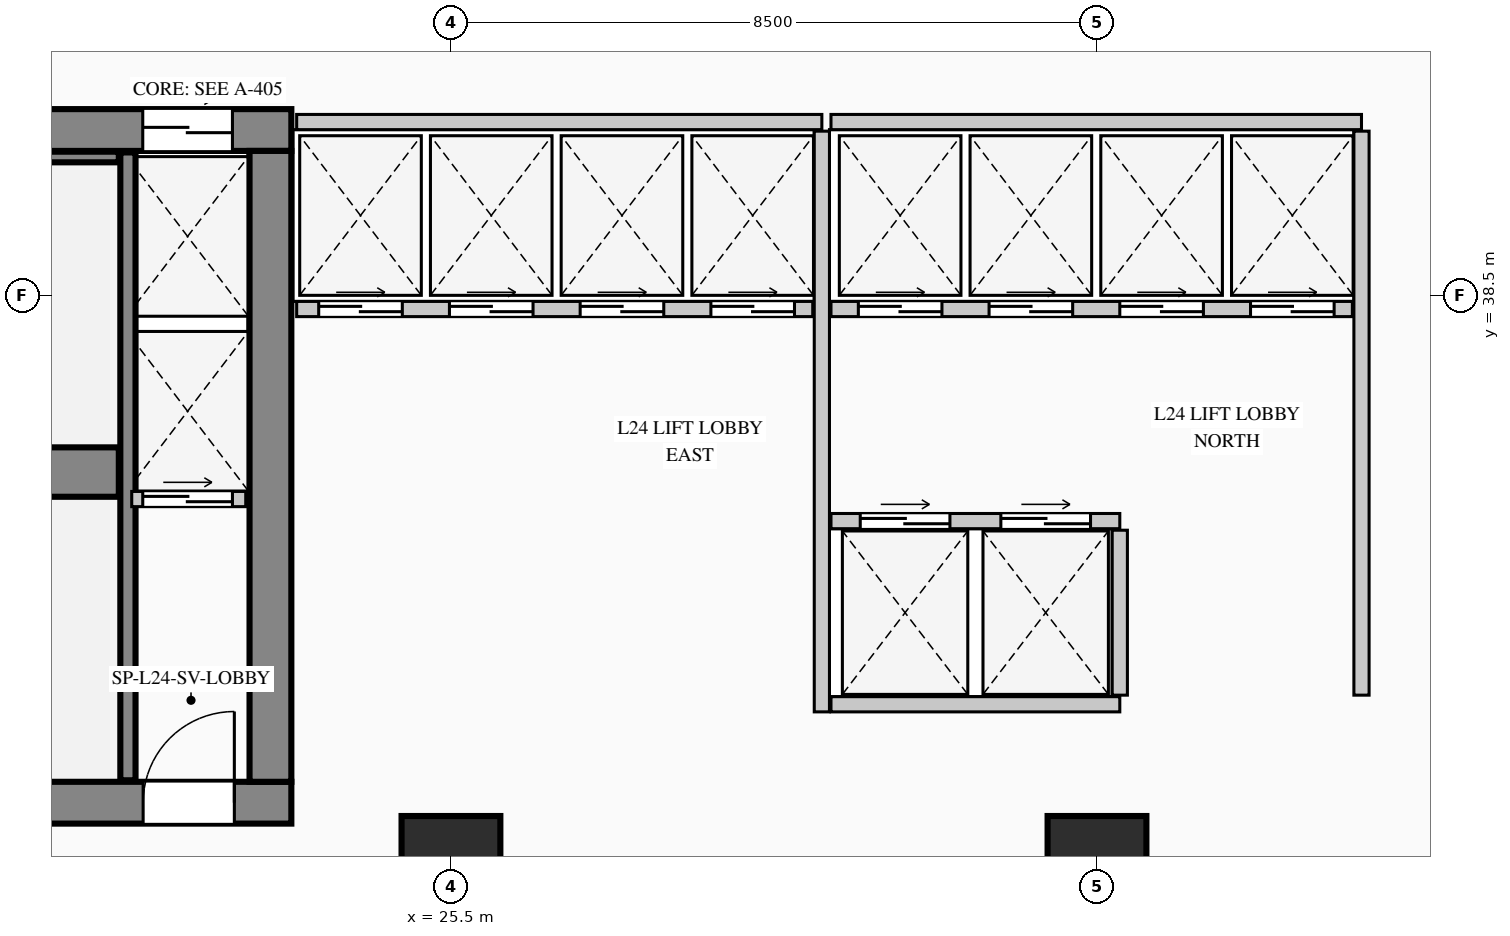
"""IFC4 building model, lengths in metres.
Left out: names, types, materials, properties, quantities, classifications, styles, units other than length and angle.
Written with IfcOpenShell. Run it as: python <this file> out.ifc"""

import sys

from ifc_helpers import new_model, si_unit, direction, frame, frame_2d, origin, origin_2d, place, context, subcontext, project, spatial, rectangle, extrude, element, fill, save


model = new_model("IFC4")
c1 = context("Model", 3, precision=1e-05, world=origin(), true_north=direction((0.0, 1.0)))
c2 = subcontext(c1, "Body", "Model", "MODEL_VIEW")
j1 = project(units=[si_unit("LENGTHUNIT", "METRE"), si_unit("PLANEANGLEUNIT", "RADIAN")], contexts=[c1])
p1 = place(None, origin())
s1 = spatial("IfcSite", under=j1, at=p1, CompositionType="ELEMENT")
p2 = place(p1, origin())
s2 = spatial("IfcBuilding", under=s1, at=p2, CompositionType="ELEMENT")
p3 = place(p2, frame((0.0, 0.0, 106.2)))
s3 = spatial("IfcBuildingStorey", under=s2, at=p3, CompositionType="ELEMENT", Elevation=106.2)
p4 = place(p3, frame((5.45, 40.675, 0.0), z_axis=(0.0, 0.0, 1.0), x_axis=(1.0, 0.0, 0.0)))
e1 = element("IfcWall", 1, at=p4, inside=s3, PredefinedType="SHEAR", context=c2, shape_type="SweptSolid", body=[
    extrude(rectangle(XDim=17.95, YDim=0.55, at=frame_2d((8.975, 0.0))), origin(), (0.0, 0.0, 1.0), 5.2),
])
p5 = place(p4, frame((15.995, 0.0, 0.0)))
e2 = element("IfcOpeningElement", 2, at=p5, cuts=e1, PredefinedType="OPENING", context=c2, shape_type="SweptSolid", body=[
    extrude(rectangle(XDim=1.18, YDim=2.25, at=frame_2d((0.59, 1.125))), frame((0.0, 0.285, 0.0), z_axis=(0.0, -1.0, 0.0), x_axis=(1.0, 0.0, 0.0)), (0.0, 0.0, 1.0), 0.57),
])
p6 = place(p3, frame((5.45, 31.825, 0.0), z_axis=(0.0, 0.0, 1.0), x_axis=(1.0, 0.0, 0.0)))
e3 = element("IfcWall", 3, at=p6, inside=s3, PredefinedType="SHEAR", context=c2, shape_type="SweptSolid", body=[
    extrude(rectangle(XDim=17.95, YDim=0.55, at=frame_2d((8.975, 0.0))), origin(), (0.0, 0.0, 1.0), 5.2),
])
p7 = place(p6, frame((3.2, 0.0, 0.0)))
e4 = element("IfcOpeningElement", 4, at=p7, cuts=e3, PredefinedType="OPENING", context=c2, shape_type="SweptSolid", body=[
    extrude(rectangle(XDim=1.2, YDim=2.2, at=frame_2d((0.6, 1.1))), frame((0.0, 0.285, 0.0), z_axis=(0.0, -1.0, 0.0), x_axis=(1.0, 0.0, 0.0)), (0.0, 0.0, 1.0), 0.57),
])
p8 = place(p6, frame((7.05, 0.0, 0.0)))
e5 = element("IfcOpeningElement", 5, at=p8, cuts=e3, PredefinedType="OPENING", context=c2, shape_type="SweptSolid", body=[
    extrude(rectangle(XDim=1.2, YDim=2.2, at=frame_2d((0.6, 1.1))), frame((0.0, 0.285, 0.0), z_axis=(0.0, -1.0, 0.0), x_axis=(1.0, 0.0, 0.0)), (0.0, 0.0, 1.0), 0.57),
])
p9 = place(p6, frame((8.9, 0.0, 0.0)))
e6 = element("IfcOpeningElement", 6, at=p9, cuts=e3, PredefinedType="OPENING", context=c2, shape_type="SweptSolid", body=[
    extrude(rectangle(XDim=1.15, YDim=2.2, at=frame_2d((0.575, 1.1))), frame((0.0, 0.285, 0.0), z_axis=(0.0, -1.0, 0.0), x_axis=(1.0, 0.0, 0.0)), (0.0, 0.0, 1.0), 0.57),
])
p10 = place(p6, frame((16.0, 0.0, 0.0)))
e7 = element("IfcOpeningElement", 7, at=p10, cuts=e3, PredefinedType="OPENING", context=c2, shape_type="SweptSolid", body=[
    extrude(rectangle(XDim=1.2, YDim=2.2, at=frame_2d((0.6, 1.1))), frame((0.0, 0.285, 0.0), z_axis=(0.0, -1.0, 0.0), x_axis=(1.0, 0.0, 0.0)), (0.0, 0.0, 1.0), 0.57),
])
p11 = place(p3, frame((23.125, 32.1, 0.0), z_axis=(0.0, 0.0, 1.0), x_axis=(0.0, 1.0, 0.0)))
e8 = element("IfcWall", 8, at=p11, inside=s3, PredefinedType="SHEAR", context=c2, shape_type="SweptSolid", body=[
    extrude(rectangle(XDim=8.3, YDim=0.55, at=frame_2d((4.15, 0.0))), origin(), (0.0, 0.0, 1.0), 5.2),
])
p12 = place(p3, frame((14.12, 36.175, 0.0), z_axis=(0.0, 0.0, 1.0), x_axis=(1.0, 0.0, 0.0)))
e9 = element("IfcWall", 9, at=p12, inside=s3, PredefinedType="SHEAR", context=c2, shape_type="SweptSolid", body=[
    extrude(rectangle(XDim=7.01, YDim=0.65, at=frame_2d((3.505, 0.0))), origin(), (0.0, 0.0, 1.0), 5.2),
])
p13 = place(p3, frame((21.25, 32.12, 0.0), z_axis=(0.0, 0.0, 1.0), x_axis=(0.0, 1.0, 0.0)))
e10 = element("IfcWall", 10, at=p13, inside=s3, PredefinedType="SHEAR", context=c2, shape_type="SweptSolid", body=[
    extrude(rectangle(XDim=8.26, YDim=0.2, at=frame_2d((4.13, 0.0))), origin(), (0.0, 0.0, 1.0), 5.2),
])
p14 = place(p3, frame((14.12, 40.32, 0.0), z_axis=(0.0, 0.0, 1.0), x_axis=(1.0, 0.0, 0.0)))
e11 = element("IfcWall", 11, at=p14, inside=s3, PredefinedType="SHEAR", context=c2, shape_type="SweptSolid", body=[
    extrude(rectangle(XDim=7.01, YDim=0.14, at=frame_2d((3.505, 0.0))), origin(), (0.0, 0.0, 1.0), 5.2),
])
for number, where, z_axis, x_axis in (
    (12, (25.5, 31.0, 0.0), (0.0, 0.0, 1.0), (1.0, 0.0, 0.0)),
    (13, (34.0, 31.0, 0.0), (0.0, 0.0, 1.0), (1.0, 0.0, 0.0)),
):
    element("IfcColumn", number, at=place(p3, frame(where, z_axis=z_axis, x_axis=x_axis)), inside=s3, PredefinedType="COLUMN", context=c2, shape_type="SweptSolid", body=[
        extrude(rectangle(XDim=1.3, YDim=1.3, at=origin_2d()), origin(), (0.0, 0.0, 1.0), 5.2),
    ])
p15 = place(p3, frame((21.3, 35.82, 0.0), z_axis=(0.0, 0.0, 1.0), x_axis=(1.0, 0.0, 0.0)))
e14 = element("IfcWall", 14, at=p15, inside=s3, PredefinedType="PARTITIONING", context=c2, shape_type="SweptSolid", body=[
    extrude(rectangle(XDim=1.5, YDim=0.2, at=frame_2d((0.75, 0.0))), origin(), (0.0, 0.0, 1.0), 4.94),
])
p16 = place(p15, frame((0.145, 0.0, 0.0)))
e15 = element("IfcOpeningElement", 15, at=p16, cuts=e14, PredefinedType="OPENING", context=c2, shape_type="SweptSolid", body=[
    extrude(rectangle(XDim=1.18, YDim=2.25, at=frame_2d((0.59, 1.125))), frame((0.0, 0.11, 0.0), z_axis=(0.0, -1.0, 0.0), x_axis=(1.0, 0.0, 0.0)), (0.0, 0.0, 1.0), 0.22),
])
p17 = place(p3, frame((23.47, 40.78, 0.0), z_axis=(0.0, 0.0, 1.0), x_axis=(1.0, 0.0, 0.0)))
e16 = element("IfcWall", 16, at=p17, inside=s3, PredefinedType="PARTITIONING", context=c2, shape_type="SweptSolid", body=[
    extrude(rectangle(XDim=6.91, YDim=0.2, at=frame_2d((3.455, 0.0))), origin(), (0.0, 0.0, 1.0), 4.94),
])
p18 = place(p3, frame((30.38, 33.02, 0.0), z_axis=(0.0, 0.0, 1.0), x_axis=(0.0, 1.0, 0.0)))
e17 = element("IfcWall", 17, at=p18, inside=s3, PredefinedType="PARTITIONING", context=c2, shape_type="SweptSolid", body=[
    extrude(rectangle(XDim=7.64, YDim=0.2, at=frame_2d((3.82, 0.0))), origin(), (0.0, 0.0, 1.0), 4.94),
])
p19 = place(p3, frame((23.47, 38.32, 0.0), z_axis=(0.0, 0.0, 1.0), x_axis=(1.0, 0.0, 0.0)))
e18 = element("IfcWall", 18, at=p19, inside=s3, PredefinedType="PARTITIONING", context=c2, shape_type="SweptSolid", body=[
    extrude(rectangle(XDim=6.79, YDim=0.2, at=frame_2d((3.395, 0.0))), origin(), (0.0, 0.0, 1.0), 4.94),
])
p20 = place(p19, frame((0.29, 0.0, 0.0)))
e19 = element("IfcOpeningElement", 19, at=p20, cuts=e18, PredefinedType="OPENING", context=c2, shape_type="SweptSolid", body=[
    extrude(rectangle(XDim=1.1, YDim=2.2, at=frame_2d((0.55, 1.1))), frame((0.0, 0.11, 0.0), z_axis=(0.0, -1.0, 0.0), x_axis=(1.0, 0.0, 0.0)), (0.0, 0.0, 1.0), 0.22),
])
p21 = place(p19, frame((2.01, 0.0, 0.0)))
e20 = element("IfcOpeningElement", 20, at=p21, cuts=e18, PredefinedType="OPENING", context=c2, shape_type="SweptSolid", body=[
    extrude(rectangle(XDim=1.1, YDim=2.2, at=frame_2d((0.55, 1.1))), frame((0.0, 0.11, 0.0), z_axis=(0.0, -1.0, 0.0), x_axis=(1.0, 0.0, 0.0)), (0.0, 0.0, 1.0), 0.22),
])
p22 = place(p19, frame((3.73, 0.0, 0.0)))
e21 = element("IfcOpeningElement", 21, at=p22, cuts=e18, PredefinedType="OPENING", context=c2, shape_type="SweptSolid", body=[
    extrude(rectangle(XDim=1.1, YDim=2.2, at=frame_2d((0.55, 1.1))), frame((0.0, 0.11, 0.0), z_axis=(0.0, -1.0, 0.0), x_axis=(1.0, 0.0, 0.0)), (0.0, 0.0, 1.0), 0.22),
])
p23 = place(p19, frame((5.45, 0.0, 0.0)))
e22 = element("IfcOpeningElement", 22, at=p23, cuts=e18, PredefinedType="OPENING", context=c2, shape_type="SweptSolid", body=[
    extrude(rectangle(XDim=1.1, YDim=2.2, at=frame_2d((0.55, 1.1))), frame((0.0, 0.11, 0.0), z_axis=(0.0, -1.0, 0.0), x_axis=(1.0, 0.0, 0.0)), (0.0, 0.0, 1.0), 0.22),
])
p24 = place(p3, frame((30.5, 40.78, 0.0), z_axis=(0.0, 0.0, 1.0), x_axis=(1.0, 0.0, 0.0)))
e23 = element("IfcWall", 23, at=p24, inside=s3, PredefinedType="PARTITIONING", context=c2, shape_type="SweptSolid", body=[
    extrude(rectangle(XDim=6.98, YDim=0.2, at=frame_2d((3.49, 0.0))), origin(), (0.0, 0.0, 1.0), 4.94),
])
p25 = place(p3, frame((37.48, 33.24, 0.0), z_axis=(0.0, 0.0, 1.0), x_axis=(0.0, 1.0, 0.0)))
e24 = element("IfcWall", 24, at=p25, inside=s3, PredefinedType="PARTITIONING", context=c2, shape_type="SweptSolid", body=[
    extrude(rectangle(XDim=7.42, YDim=0.2, at=frame_2d((3.71, 0.0))), origin(), (0.0, 0.0, 1.0), 4.94),
])
p26 = place(p3, frame((30.5, 38.32, 0.0), z_axis=(0.0, 0.0, 1.0), x_axis=(1.0, 0.0, 0.0)))
e25 = element("IfcWall", 25, at=p26, inside=s3, PredefinedType="PARTITIONING", context=c2, shape_type="SweptSolid", body=[
    extrude(rectangle(XDim=6.86, YDim=0.2, at=frame_2d((3.43, 0.0))), origin(), (0.0, 0.0, 1.0), 4.94),
])
p27 = place(p26, frame((0.36, 0.0, 0.0)))
e26 = element("IfcOpeningElement", 26, at=p27, cuts=e25, PredefinedType="OPENING", context=c2, shape_type="SweptSolid", body=[
    extrude(rectangle(XDim=1.1, YDim=2.2, at=frame_2d((0.55, 1.1))), frame((0.0, 0.11, 0.0), z_axis=(0.0, -1.0, 0.0), x_axis=(1.0, 0.0, 0.0)), (0.0, 0.0, 1.0), 0.22),
])
p28 = place(p26, frame((2.08, 0.0, 0.0)))
e27 = element("IfcOpeningElement", 27, at=p28, cuts=e25, PredefinedType="OPENING", context=c2, shape_type="SweptSolid", body=[
    extrude(rectangle(XDim=1.1, YDim=2.2, at=frame_2d((0.55, 1.1))), frame((0.0, 0.11, 0.0), z_axis=(0.0, -1.0, 0.0), x_axis=(1.0, 0.0, 0.0)), (0.0, 0.0, 1.0), 0.22),
])
p29 = place(p26, frame((3.8, 0.0, 0.0)))
e28 = element("IfcOpeningElement", 28, at=p29, cuts=e25, PredefinedType="OPENING", context=c2, shape_type="SweptSolid", body=[
    extrude(rectangle(XDim=1.1, YDim=2.2, at=frame_2d((0.55, 1.1))), frame((0.0, 0.11, 0.0), z_axis=(0.0, -1.0, 0.0), x_axis=(1.0, 0.0, 0.0)), (0.0, 0.0, 1.0), 0.22),
])
p30 = place(p26, frame((5.52, 0.0, 0.0)))
e29 = element("IfcOpeningElement", 29, at=p30, cuts=e25, PredefinedType="OPENING", context=c2, shape_type="SweptSolid", body=[
    extrude(rectangle(XDim=1.1, YDim=2.2, at=frame_2d((0.55, 1.1))), frame((0.0, 0.11, 0.0), z_axis=(0.0, -1.0, 0.0), x_axis=(1.0, 0.0, 0.0)), (0.0, 0.0, 1.0), 0.22),
])
p31 = place(p3, frame((30.5, 35.53, 0.0), z_axis=(0.0, 0.0, 1.0), x_axis=(1.0, 0.0, 0.0)))
e30 = element("IfcWall", 30, at=p31, inside=s3, PredefinedType="PARTITIONING", context=c2, shape_type="SweptSolid", body=[
    extrude(rectangle(XDim=3.8, YDim=0.2, at=frame_2d((1.9, 0.0))), origin(), (0.0, 0.0, 1.0), 4.94),
])
p32 = place(p31, frame((0.385, 0.0, 0.0)))
e31 = element("IfcOpeningElement", 31, at=p32, cuts=e30, PredefinedType="OPENING", context=c2, shape_type="SweptSolid", body=[
    extrude(rectangle(XDim=1.18, YDim=2.25, at=frame_2d((0.59, 1.125))), frame((0.0, 0.11, 0.0), z_axis=(0.0, -1.0, 0.0), x_axis=(1.0, 0.0, 0.0)), (0.0, 0.0, 1.0), 0.22),
])
p33 = place(p31, frame((2.235, 0.0, 0.0)))
e32 = element("IfcOpeningElement", 32, at=p33, cuts=e30, PredefinedType="OPENING", context=c2, shape_type="SweptSolid", body=[
    extrude(rectangle(XDim=1.18, YDim=2.25, at=frame_2d((0.59, 1.125))), frame((0.0, 0.11, 0.0), z_axis=(0.0, -1.0, 0.0), x_axis=(1.0, 0.0, 0.0)), (0.0, 0.0, 1.0), 0.22),
])
p34 = place(p3, frame((30.5, 33.12, 0.0), z_axis=(0.0, 0.0, 1.0), x_axis=(1.0, 0.0, 0.0)))
e33 = element("IfcWall", 33, at=p34, inside=s3, PredefinedType="PARTITIONING", context=c2, shape_type="SweptSolid", body=[
    extrude(rectangle(XDim=3.8, YDim=0.2, at=frame_2d((1.9, 0.0))), origin(), (0.0, 0.0, 1.0), 4.94),
])
p35 = place(p3, frame((34.3, 33.24, 0.0), z_axis=(0.0, 0.0, 1.0), x_axis=(0.0, 1.0, 0.0)))
e34 = element("IfcWall", 34, at=p35, inside=s3, PredefinedType="PARTITIONING", context=c2, shape_type="SweptSolid", body=[
    extrude(rectangle(XDim=2.17, YDim=0.2, at=frame_2d((1.085, 0.0))), origin(), (0.0, 0.0, 1.0), 4.94),
])
p36 = place(p10, origin())
e35 = element("IfcDoor", 35, at=p36, inside=s3, OperationType="SINGLE_SWING_RIGHT", PredefinedType="DOOR", context=c2, shape_type="SweptSolid", body=[
    extrude(rectangle(XDim=1.2, YDim=2.2, at=frame_2d((0.6, 1.1))), frame((0.0, 0.025, 0.0), z_axis=(0.0, -1.0, 0.0), x_axis=(1.0, 0.0, 0.0)), (0.0, 0.0, 1.0), 0.05),
])
fill(e7, e35)
p37 = place(p5, origin())
e36 = element("IfcDoor", 36, at=p37, inside=s3, OperationType="DOUBLE_DOOR_SLIDING", PredefinedType="DOOR", context=c2, shape_type="SweptSolid", body=[
    extrude(rectangle(XDim=1.18, YDim=2.25, at=frame_2d((0.59, 1.125))), frame((0.0, 0.025, 0.0), z_axis=(0.0, -1.0, 0.0), x_axis=(1.0, 0.0, 0.0)), (0.0, 0.0, 1.0), 0.05),
])
fill(e2, e36)
p38 = place(p16, origin())
e37 = element("IfcDoor", 37, at=p38, inside=s3, OperationType="DOUBLE_DOOR_SLIDING", PredefinedType="DOOR", context=c2, shape_type="SweptSolid", body=[
    extrude(rectangle(XDim=1.18, YDim=2.25, at=frame_2d((0.59, 1.125))), frame((0.0, 0.025, 0.0), z_axis=(0.0, -1.0, 0.0), x_axis=(1.0, 0.0, 0.0)), (0.0, 0.0, 1.0), 0.05),
])
fill(e15, e37)
p39 = place(p20, origin())
e38 = element("IfcDoor", 38, at=p39, inside=s3, OperationType="DOUBLE_DOOR_SLIDING", PredefinedType="DOOR", context=c2, shape_type="SweptSolid", body=[
    extrude(rectangle(XDim=1.1, YDim=2.2, at=frame_2d((0.55, 1.1))), frame((0.0, 0.025, 0.0), z_axis=(0.0, -1.0, 0.0), x_axis=(1.0, 0.0, 0.0)), (0.0, 0.0, 1.0), 0.05),
])
fill(e19, e38)
p40 = place(p21, origin())
e39 = element("IfcDoor", 39, at=p40, inside=s3, OperationType="DOUBLE_DOOR_SLIDING", PredefinedType="DOOR", context=c2, shape_type="SweptSolid", body=[
    extrude(rectangle(XDim=1.1, YDim=2.2, at=frame_2d((0.55, 1.1))), frame((0.0, 0.025, 0.0), z_axis=(0.0, -1.0, 0.0), x_axis=(1.0, 0.0, 0.0)), (0.0, 0.0, 1.0), 0.05),
])
fill(e20, e39)
p41 = place(p22, origin())
e40 = element("IfcDoor", 40, at=p41, inside=s3, OperationType="DOUBLE_DOOR_SLIDING", PredefinedType="DOOR", context=c2, shape_type="SweptSolid", body=[
    extrude(rectangle(XDim=1.1, YDim=2.2, at=frame_2d((0.55, 1.1))), frame((0.0, 0.025, 0.0), z_axis=(0.0, -1.0, 0.0), x_axis=(1.0, 0.0, 0.0)), (0.0, 0.0, 1.0), 0.05),
])
fill(e21, e40)
p42 = place(p23, origin())
e41 = element("IfcDoor", 41, at=p42, inside=s3, OperationType="DOUBLE_DOOR_SLIDING", PredefinedType="DOOR", context=c2, shape_type="SweptSolid", body=[
    extrude(rectangle(XDim=1.1, YDim=2.2, at=frame_2d((0.55, 1.1))), frame((0.0, 0.025, 0.0), z_axis=(0.0, -1.0, 0.0), x_axis=(1.0, 0.0, 0.0)), (0.0, 0.0, 1.0), 0.05),
])
fill(e22, e41)
p43 = place(p27, origin())
e42 = element("IfcDoor", 42, at=p43, inside=s3, OperationType="DOUBLE_DOOR_SLIDING", PredefinedType="DOOR", context=c2, shape_type="SweptSolid", body=[
    extrude(rectangle(XDim=1.1, YDim=2.2, at=frame_2d((0.55, 1.1))), frame((0.0, 0.025, 0.0), z_axis=(0.0, -1.0, 0.0), x_axis=(1.0, 0.0, 0.0)), (0.0, 0.0, 1.0), 0.05),
])
fill(e26, e42)
p44 = place(p28, origin())
e43 = element("IfcDoor", 43, at=p44, inside=s3, OperationType="DOUBLE_DOOR_SLIDING", PredefinedType="DOOR", context=c2, shape_type="SweptSolid", body=[
    extrude(rectangle(XDim=1.1, YDim=2.2, at=frame_2d((0.55, 1.1))), frame((0.0, 0.025, 0.0), z_axis=(0.0, -1.0, 0.0), x_axis=(1.0, 0.0, 0.0)), (0.0, 0.0, 1.0), 0.05),
])
fill(e27, e43)
p45 = place(p29, origin())
e44 = element("IfcDoor", 44, at=p45, inside=s3, OperationType="DOUBLE_DOOR_SLIDING", PredefinedType="DOOR", context=c2, shape_type="SweptSolid", body=[
    extrude(rectangle(XDim=1.1, YDim=2.2, at=frame_2d((0.55, 1.1))), frame((0.0, 0.025, 0.0), z_axis=(0.0, -1.0, 0.0), x_axis=(1.0, 0.0, 0.0)), (0.0, 0.0, 1.0), 0.05),
])
fill(e28, e44)
p46 = place(p30, origin())
e45 = element("IfcDoor", 45, at=p46, inside=s3, OperationType="DOUBLE_DOOR_SLIDING", PredefinedType="DOOR", context=c2, shape_type="SweptSolid", body=[
    extrude(rectangle(XDim=1.1, YDim=2.2, at=frame_2d((0.55, 1.1))), frame((0.0, 0.025, 0.0), z_axis=(0.0, -1.0, 0.0), x_axis=(1.0, 0.0, 0.0)), (0.0, 0.0, 1.0), 0.05),
])
fill(e29, e45)
p47 = place(p32, origin())
e46 = element("IfcDoor", 46, at=p47, inside=s3, OperationType="DOUBLE_DOOR_SLIDING", PredefinedType="DOOR", context=c2, shape_type="SweptSolid", body=[
    extrude(rectangle(XDim=1.18, YDim=2.25, at=frame_2d((0.59, 1.125))), frame((0.0, 0.025, 0.0), z_axis=(0.0, -1.0, 0.0), x_axis=(1.0, 0.0, 0.0)), (0.0, 0.0, 1.0), 0.05),
])
fill(e31, e46)
p48 = place(p33, origin())
e47 = element("IfcDoor", 47, at=p48, inside=s3, OperationType="DOUBLE_DOOR_SLIDING", PredefinedType="DOOR", context=c2, shape_type="SweptSolid", body=[
    extrude(rectangle(XDim=1.18, YDim=2.25, at=frame_2d((0.59, 1.125))), frame((0.0, 0.025, 0.0), z_axis=(0.0, -1.0, 0.0), x_axis=(1.0, 0.0, 0.0)), (0.0, 0.0, 1.0), 0.05),
])
fill(e32, e47)
save(model, sys.argv[1])
